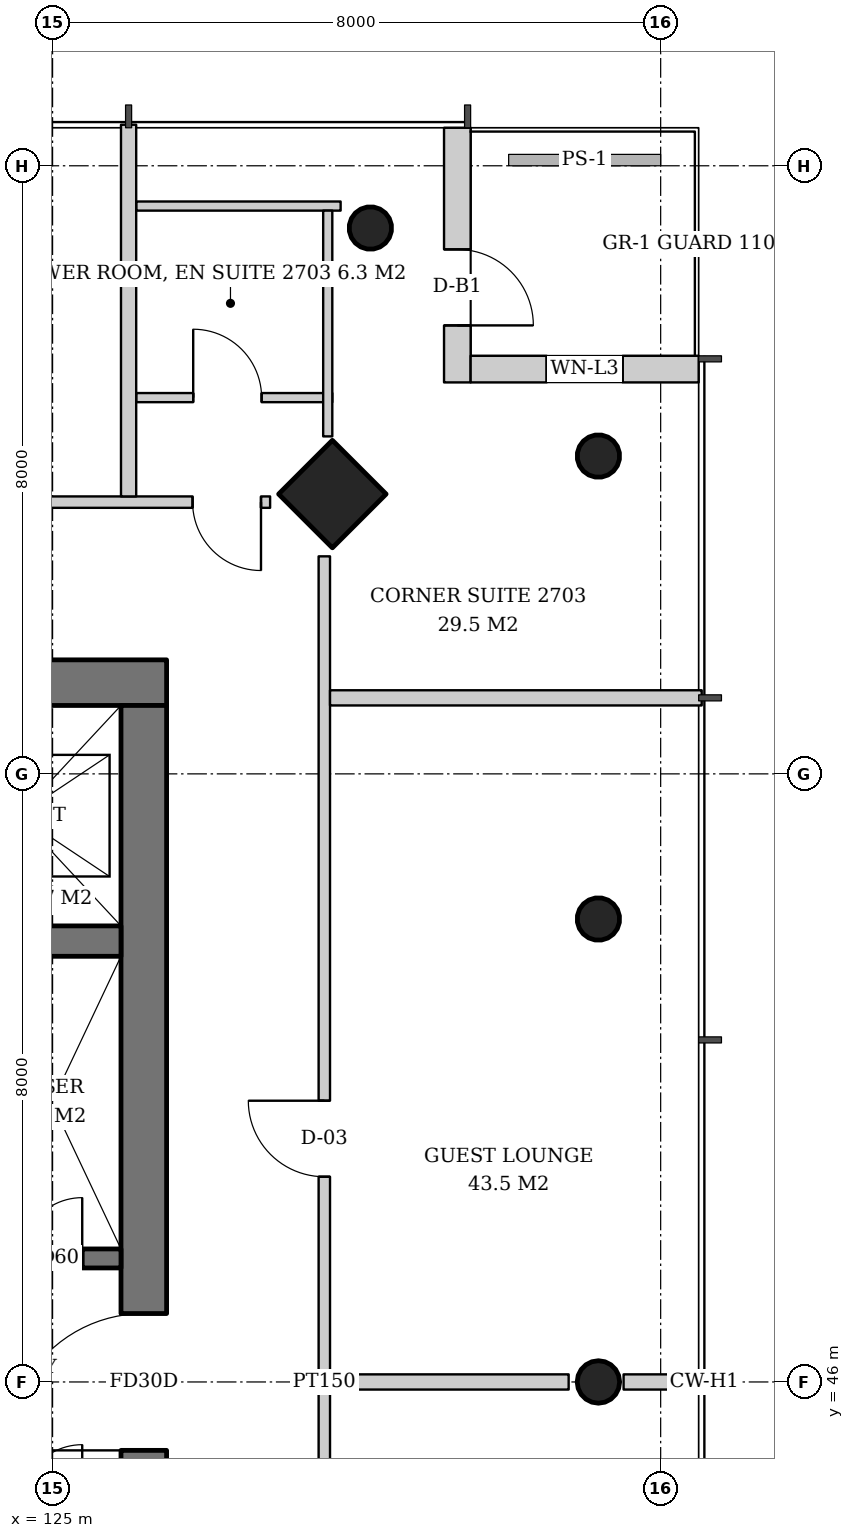
"""IFC4 building model, lengths in metres.
Left out: names, types, materials, properties, quantities, classifications, styles, units other than length and angle.
Written with IfcOpenShell. Run it as: python <this file> out.ifc"""

import sys

from ifc_helpers import new_model, si_unit, direction, frame, frame_2d, origin, origin_2d, place, context, subcontext, project, spatial, rectangle, hollow_circle, extrude, element, fill, save


model = new_model("IFC4")
c1 = context("Model", 3, precision=1e-05, world=origin(), true_north=direction((0.0, 1.0)))
c2 = subcontext(c1, "Body", "Model", "MODEL_VIEW")
j1 = project(units=[si_unit("LENGTHUNIT", "METRE"), si_unit("PLANEANGLEUNIT", "RADIAN")], contexts=[c1])
p1 = place(None, origin())
s1 = spatial("IfcSite", under=j1, at=p1, CompositionType="ELEMENT")
p2 = place(p1, origin())
s2 = spatial("IfcBuilding", under=s1, at=p2, CompositionType="ELEMENT")
p3 = place(p2, frame((0.0, 0.0, 108.4)))
s3 = spatial("IfcBuildingStorey", under=s2, at=p3, CompositionType="ELEMENT", Elevation=108.4)
p4 = place(p3, frame((128.733, 57.733, 0.0), z_axis=(-0.043029647111, -0.043029647111, 0.998146732169), x_axis=(0.707106781187, -0.707106781187, 0.0)))
e1 = element("IfcColumn", 1, at=p4, inside=s3, PredefinedType="COLUMN", context=c2, shape_type="SweptSolid", body=[
    extrude(rectangle(XDim=1.0, YDim=1.0, at=origin_2d()), origin(), (0.0, 0.0, 1.0), 3.807),
])
p5 = place(p3, frame((132.233, 58.233, 0.0), z_axis=(-0.043029647111, -0.043029647111, 0.998146732169), x_axis=(0.707106781187, -0.707106781187, 0.0)))
e2 = element("IfcColumn", 2, at=p5, inside=s3, PredefinedType="COLUMN", context=c2, shape_type="SweptSolid", body=[
    extrude(hollow_circle(Radius=0.28, WallThickness=0.02, at=origin_2d()), origin(), (0.0, 0.0, 1.0), 3.807),
])
p6 = place(p3, frame((132.233, 46.0, 0.0), z_axis=(-0.043069538298, 0.0, 0.999072076915), x_axis=(0.0, -1.0, 0.0)))
e3 = element("IfcColumn", 3, at=p6, inside=s3, PredefinedType="COLUMN", context=c2, shape_type="SweptSolid", body=[
    extrude(hollow_circle(Radius=0.28, WallThickness=0.02, at=origin_2d()), origin(), (0.0, 0.0, 1.0), 3.803),
])
p7 = place(p3, frame((132.233, 52.116, 0.0), z_axis=(-0.043059525333, -0.021561848751, 0.998839808957), x_axis=(0.44774654769, -0.894160516368, 0.0)))
e4 = element("IfcColumn", 4, at=p7, inside=s3, PredefinedType="COLUMN", context=c2, shape_type="SweptSolid", body=[
    extrude(hollow_circle(Radius=0.28, WallThickness=0.02, at=origin_2d()), origin(), (0.0, 0.0, 1.0), 3.804),
])
p8 = place(p3, frame((129.233, 61.233, 0.0), z_axis=(-0.043029647111, -0.043029647111, 0.998146732169), x_axis=(0.707106781187, -0.707106781187, 0.0)))
e5 = element("IfcColumn", 5, at=p8, inside=s3, PredefinedType="COLUMN", context=c2, shape_type="SweptSolid", body=[
    extrude(hollow_circle(Radius=0.28, WallThickness=0.02, at=origin_2d()), origin(), (0.0, 0.0, 1.0), 3.807),
])
p9 = place(p3, frame((107.5, 55.2, 0.0), z_axis=(0.0, 0.0, 1.0), x_axis=(1.0, 0.0, 0.0)))
e6 = element("IfcWall", 6, at=p9, inside=s3, PredefinedType="SHEAR", context=c2, shape_type="SweptSolid", body=[
    extrude(rectangle(XDim=19.0, YDim=0.6, at=frame_2d((9.5, 0.0))), origin(), (0.0, 0.0, 1.0), 3.8),
])
p10 = place(p9, frame((14.14, 0.0, 0.0)))
e7 = element("IfcOpeningElement", 7, at=p10, cuts=e6, PredefinedType="OPENING", context=c2, shape_type="SweptSolid", body=[
    extrude(rectangle(XDim=1.0, YDim=2.1, at=frame_2d((0.5, 1.05))), frame((0.0, 0.31, 0.0), z_axis=(0.0, -1.0, 0.0), x_axis=(1.0, 0.0, 0.0)), (0.0, 0.0, 1.0), 0.62),
])
p11 = place(p9, frame((1.675, 0.0, 0.0)))
e8 = element("IfcOpeningElement", 8, at=p11, cuts=e6, PredefinedType="OPENING", context=c2, shape_type="SweptSolid", body=[
    extrude(rectangle(XDim=1.0, YDim=2.1, at=frame_2d((0.5, 1.05))), frame((0.0, 0.31, 0.0), z_axis=(0.0, -1.0, 0.0), x_axis=(1.0, 0.0, 0.0)), (0.0, 0.0, 1.0), 0.62),
])
p12 = place(p9, frame((3.587, 0.0, 0.0)))
e9 = element("IfcOpeningElement", 9, at=p12, cuts=e6, PredefinedType="OPENING", context=c2, shape_type="SweptSolid", body=[
    extrude(rectangle(XDim=1.0, YDim=2.1, at=frame_2d((0.5, 1.05))), frame((0.0, 0.31, 0.0), z_axis=(0.0, -1.0, 0.0), x_axis=(1.0, 0.0, 0.0)), (0.0, 0.0, 1.0), 0.62),
])
p13 = place(p3, frame((126.2, 37.1, 0.0), z_axis=(0.0, 0.0, 1.0), x_axis=(0.0, 1.0, 0.0)))
e10 = element("IfcWall", 10, at=p13, inside=s3, PredefinedType="SHEAR", context=c2, shape_type="SweptSolid", body=[
    extrude(rectangle(XDim=17.8, YDim=0.6, at=frame_2d((8.9, 0.0))), origin(), (0.0, 0.0, 1.0), 3.8),
])
p14 = place(p13, frame((8.0, 0.0, 0.0)))
e11 = element("IfcOpeningElement", 11, at=p14, cuts=e10, PredefinedType="OPENING", context=c2, shape_type="SweptSolid", body=[
    extrude(rectangle(XDim=1.8, YDim=2.4, at=frame_2d((0.9, 1.2))), frame((0.0, 0.31, 0.0), z_axis=(0.0, -1.0, 0.0), x_axis=(1.0, 0.0, 0.0)), (0.0, 0.0, 1.0), 0.62),
])
p15 = place(p3, frame((108.1, 51.8, 0.0), z_axis=(0.0, 0.0, 1.0), x_axis=(1.0, 0.0, 0.0)))
e12 = element("IfcWall", 12, at=p15, inside=s3, PredefinedType="SHEAR", context=c2, shape_type="SweptSolid", body=[
    extrude(rectangle(XDim=17.8, YDim=0.4, at=frame_2d((8.9, 0.0))), origin(), (0.0, 0.0, 1.0), 3.8),
])
p16 = place(p3, frame((130.325, 62.5, 0.0), z_axis=(0.0, 0.0, 1.0), x_axis=(0.0, -1.0, 0.0)))
e13 = element("IfcWall", 13, at=p16, inside=s3, PredefinedType="SOLIDWALL", context=c2, shape_type="SweptSolid", body=[
    extrude(rectangle(XDim=3.35, YDim=0.35, at=frame_2d((1.675, 0.0))), origin(), (0.0, 0.0, 1.0), 3.6),
])
p17 = place(p16, frame((1.6, 0.0, 0.0)))
e14 = element("IfcOpeningElement", 14, at=p17, cuts=e13, PredefinedType="OPENING", context=c2, shape_type="SweptSolid", body=[
    extrude(rectangle(XDim=1.0, YDim=2.4, at=frame_2d((0.5, 1.2))), frame((0.0, 0.185, 0.0), z_axis=(0.0, -1.0, 0.0), x_axis=(1.0, 0.0, 0.0)), (0.0, 0.0, 1.0), 0.37),
])
p18 = place(p3, frame((130.5, 59.325, 0.0), z_axis=(0.0, 0.0, 1.0), x_axis=(1.0, 0.0, 0.0)))
e15 = element("IfcWall", 15, at=p18, inside=s3, PredefinedType="SOLIDWALL", context=c2, shape_type="SweptSolid", body=[
    extrude(rectangle(XDim=3.0, YDim=0.35, at=frame_2d((1.5, 0.0))), origin(), (0.0, 0.0, 1.0), 3.6),
])
p19 = place(p18, frame((1.0, 0.0, 0.9)))
e16 = element("IfcOpeningElement", 16, at=p19, cuts=e15, PredefinedType="OPENING", context=c2, shape_type="SweptSolid", body=[
    extrude(rectangle(XDim=1.0, YDim=2.4, at=frame_2d((0.5, 1.2))), frame((0.0, 0.185, 0.0), z_axis=(0.0, -1.0, 0.0), x_axis=(1.0, 0.0, 0.0)), (0.0, 0.0, 1.0), 0.37),
])
p20 = place(p3, frame((121.33, 47.625, 0.0), z_axis=(0.0, 0.0, 1.0), x_axis=(1.0, 0.0, 0.0)))
e17 = element("IfcWall", 17, at=p20, inside=s3, PredefinedType="SHEAR", context=c2, shape_type="SweptSolid", body=[
    extrude(rectangle(XDim=4.57, YDim=0.25, at=frame_2d((2.285, 0.0))), origin(), (0.0, 0.0, 1.0), 3.8),
])
p21 = place(p20, frame((0.55, 0.0, 0.0)))
e18 = element("IfcOpeningElement", 18, at=p21, cuts=e17, PredefinedType="OPENING", context=c2, shape_type="SweptSolid", body=[
    extrude(rectangle(XDim=1.4, YDim=2.4, at=frame_2d((0.7, 1.2))), frame((0.0, 0.135, 0.0), z_axis=(0.0, -1.0, 0.0), x_axis=(1.0, 0.0, 0.0)), (0.0, 0.0, 1.0), 0.27),
])
p22 = place(p20, frame((3.26, 0.0, 0.0)))
e19 = element("IfcOpeningElement", 19, at=p22, cuts=e17, PredefinedType="OPENING", context=c2, shape_type="SweptSolid", body=[
    extrude(rectangle(XDim=0.8, YDim=2.0, at=frame_2d((0.4, 1.0))), frame((0.0, 0.135, 0.0), z_axis=(0.0, -1.0, 0.0), x_axis=(1.0, 0.0, 0.0)), (0.0, 0.0, 1.0), 0.27),
])
p23 = place(p3, frame((128.575, 35.138, 0.0), z_axis=(0.0, 0.0, 1.0), x_axis=(0.0, 1.0, 0.0)))
e20 = element("IfcWall", 20, at=p23, inside=s3, PredefinedType="PARTITIONING", context=c2, shape_type="SweptSolid", body=[
    extrude(rectangle(XDim=21.724, YDim=0.15, at=frame_2d((10.862, 0.0))), origin(), (0.0, 0.0, 1.0), 2.9),
])
p24 = place(p23, frame((0.12, 0.0, 0.0)))
e21 = element("IfcOpeningElement", 21, at=p24, cuts=e20, PredefinedType="OPENING", context=c2, shape_type="SweptSolid", body=[
    extrude(rectangle(XDim=0.9, YDim=2.1, at=frame_2d((0.45, 1.05))), frame((0.0, 0.085, 0.0), z_axis=(0.0, -1.0, 0.0), x_axis=(1.0, 0.0, 0.0)), (0.0, 0.0, 1.0), 0.17),
])
p25 = place(p23, frame((4.612, 0.0, 0.0)))
e22 = element("IfcOpeningElement", 22, at=p25, cuts=e20, PredefinedType="OPENING", context=c2, shape_type="SweptSolid", body=[
    extrude(rectangle(XDim=0.9, YDim=2.1, at=frame_2d((0.45, 1.05))), frame((0.0, 0.085, 0.0), z_axis=(0.0, -1.0, 0.0), x_axis=(1.0, 0.0, 0.0)), (0.0, 0.0, 1.0), 0.17),
])
p26 = place(p23, frame((13.562, 0.0, 0.0)))
e23 = element("IfcOpeningElement", 23, at=p26, cuts=e20, PredefinedType="OPENING", context=c2, shape_type="SweptSolid", body=[
    extrude(rectangle(XDim=1.0, YDim=2.1, at=frame_2d((0.5, 1.05))), frame((0.0, 0.085, 0.0), z_axis=(0.0, -1.0, 0.0), x_axis=(1.0, 0.0, 0.0)), (0.0, 0.0, 1.0), 0.17),
])
p27 = place(p3, frame((128.65, 46.0, 0.0), z_axis=(0.0, 0.0, 1.0), x_axis=(1.0, 0.0, 0.0)))
e24 = element("IfcWall", 24, at=p27, inside=s3, PredefinedType="PARTITIONING", context=c2, shape_type="SweptSolid", body=[
    extrude(rectangle(XDim=3.14, YDim=0.2, at=frame_2d((1.57, 0.0))), origin(), (0.0, 0.0, 1.0), 3.6),
])
p28 = place(p3, frame((132.512, 46.0, 0.0), z_axis=(0.0, 0.0, 1.0), x_axis=(1.0, 0.0, 0.0)))
e25 = element("IfcWall", 25, at=p28, inside=s3, PredefinedType="PARTITIONING", context=c2, shape_type="SweptSolid", body=[
    extrude(rectangle(XDim=1.028, YDim=0.2, at=frame_2d((0.514, 0.0))), origin(), (0.0, 0.0, 1.0), 3.6),
])
p29 = place(p3, frame((128.65, 55.0, 0.0), z_axis=(0.0, 0.0, 1.0), x_axis=(1.0, 0.0, 0.0)))
e26 = element("IfcWall", 26, at=p29, inside=s3, PredefinedType="PARTITIONING", context=c2, shape_type="SweptSolid", body=[
    extrude(rectangle(XDim=4.89, YDim=0.2, at=frame_2d((2.445, 0.0))), origin(), (0.0, 0.0, 1.0), 3.2),
])
p30 = place(p3, frame((126.1, 58.95, 0.0), z_axis=(0.0, 0.0, 1.0), x_axis=(1.0, 0.0, 0.0)))
e27 = element("IfcWall", 27, at=p30, inside=s3, PredefinedType="PARTITIONING", context=c2, shape_type="SweptSolid", body=[
    extrude(rectangle(XDim=2.58, YDim=0.12, at=frame_2d((1.29, 0.0))), origin(), (0.0, 0.0, 1.0), 2.9),
])
p31 = place(p30, frame((0.75, 0.0, 0.0)))
e28 = element("IfcOpeningElement", 28, at=p31, cuts=e27, PredefinedType="OPENING", context=c2, shape_type="SweptSolid", body=[
    extrude(rectangle(XDim=0.9, YDim=2.1, at=frame_2d((0.45, 1.05))), frame((0.0, 0.07, 0.0), z_axis=(0.0, -1.0, 0.0), x_axis=(1.0, 0.0, 0.0)), (0.0, 0.0, 1.0), 0.14),
])
p32 = place(p3, frame((126.1, 61.47, 0.0), z_axis=(0.0, 0.0, 1.0), x_axis=(1.0, 0.0, 0.0)))
e29 = element("IfcWall", 29, at=p32, inside=s3, PredefinedType="PARTITIONING", context=c2, shape_type="SweptSolid", body=[
    extrude(rectangle(XDim=2.689, YDim=0.12, at=frame_2d((1.345, 0.0))), origin(), (0.0, 0.0, 1.0), 3.6),
])
p33 = place(p3, frame((128.62, 58.44, 0.0), z_axis=(0.0, 0.0, 1.0), x_axis=(0.0, 1.0, 0.0)))
e30 = element("IfcWall", 30, at=p33, inside=s3, PredefinedType="PARTITIONING", context=c2, shape_type="SweptSolid", body=[
    extrude(rectangle(XDim=2.97, YDim=0.12, at=frame_2d((1.485, 0.0))), origin(), (0.0, 0.0, 1.0), 3.2),
])
p34 = place(p3, frame((127.862, 57.575, 0.0), z_axis=(0.0, 0.0, 1.0), x_axis=(-1.0, 0.0, 0.0)))
e31 = element("IfcWall", 31, at=p34, inside=s3, PredefinedType="PARTITIONING", context=c2, shape_type="SweptSolid", body=[
    extrude(rectangle(XDim=21.724, YDim=0.15, at=frame_2d((10.862, 0.0))), origin(), (0.0, 0.0, 1.0), 2.9),
])
p35 = place(p34, frame((0.12, 0.0, 0.0)))
e32 = element("IfcOpeningElement", 32, at=p35, cuts=e31, PredefinedType="OPENING", context=c2, shape_type="SweptSolid", body=[
    extrude(rectangle(XDim=0.9, YDim=2.1, at=frame_2d((0.45, 1.05))), frame((0.0, 0.085, 0.0), z_axis=(0.0, -1.0, 0.0), x_axis=(1.0, 0.0, 0.0)), (0.0, 0.0, 1.0), 0.17),
])
p36 = place(p34, frame((4.562, 0.0, 0.0)))
e33 = element("IfcOpeningElement", 33, at=p36, cuts=e31, PredefinedType="OPENING", context=c2, shape_type="SweptSolid", body=[
    extrude(rectangle(XDim=1.0, YDim=2.1, at=frame_2d((0.5, 1.05))), frame((0.0, 0.085, 0.0), z_axis=(0.0, -1.0, 0.0), x_axis=(1.0, 0.0, 0.0)), (0.0, 0.0, 1.0), 0.17),
])
p37 = place(p34, frame((13.612, 0.0, 0.0)))
e34 = element("IfcOpeningElement", 34, at=p37, cuts=e31, PredefinedType="OPENING", context=c2, shape_type="SweptSolid", body=[
    extrude(rectangle(XDim=0.9, YDim=2.1, at=frame_2d((0.45, 1.05))), frame((0.0, 0.085, 0.0), z_axis=(0.0, -1.0, 0.0), x_axis=(1.0, 0.0, 0.0)), (0.0, 0.0, 1.0), 0.17),
])
p38 = place(p3, frame((126.0, 57.65, 0.0), z_axis=(0.0, 0.0, 1.0), x_axis=(0.0, 1.0, 0.0)))
e35 = element("IfcWall", 35, at=p38, inside=s3, PredefinedType="PARTITIONING", context=c2, shape_type="SweptSolid", body=[
    extrude(rectangle(XDim=4.89, YDim=0.2, at=frame_2d((2.445, 0.0))), origin(), (0.0, 0.0, 1.0), 2.9),
])
p39 = place(p17, origin())
e36 = element("IfcDoor", 36, at=p39, inside=s3, OperationType="SINGLE_SWING_RIGHT", PredefinedType="DOOR", context=c2, shape_type="SweptSolid", body=[
    extrude(rectangle(XDim=1.0, YDim=2.4, at=frame_2d((0.5, 1.2))), frame((0.0, 0.025, 0.0), z_axis=(0.0, -1.0, 0.0), x_axis=(1.0, 0.0, 0.0)), (0.0, 0.0, 1.0), 0.05),
])
fill(e14, e36)
p40 = place(p19, origin())
e37 = element("IfcWindow", 37, at=p40, inside=s3, PartitioningType="SINGLE_PANEL", PredefinedType="WINDOW", context=c2, shape_type="SweptSolid", body=[
    extrude(rectangle(XDim=1.0, YDim=2.4, at=frame_2d((0.5, 1.2))), frame((0.0, 0.03, 0.0), z_axis=(0.0, -1.0, 0.0), x_axis=(1.0, 0.0, 0.0)), (0.0, 0.0, 1.0), 0.06),
])
fill(e16, e37)
p41 = place(p22, origin())
e38 = element("IfcDoor", 38, at=p41, inside=s3, OperationType="SINGLE_SWING_RIGHT", PredefinedType="DOOR", context=c2, shape_type="SweptSolid", body=[
    extrude(rectangle(XDim=0.8, YDim=2.0, at=frame_2d((0.4, 1.0))), frame((0.0, 0.025, 0.0), z_axis=(0.0, -1.0, 0.0), x_axis=(1.0, 0.0, 0.0)), (0.0, 0.0, 1.0), 0.05),
])
fill(e19, e38)
p42 = place(p14, origin())
e39 = element("IfcDoor", 39, at=p42, inside=s3, OperationType="DOUBLE_DOOR_SINGLE_SWING", PredefinedType="DOOR", context=c2, shape_type="SweptSolid", body=[
    extrude(rectangle(XDim=1.8, YDim=2.4, at=frame_2d((0.9, 1.2))), frame((0.0, 0.025, 0.0), z_axis=(0.0, -1.0, 0.0), x_axis=(1.0, 0.0, 0.0)), (0.0, 0.0, 1.0), 0.05),
])
fill(e11, e39)
p43 = place(p26, origin())
e40 = element("IfcDoor", 40, at=p43, inside=s3, OperationType="SINGLE_SWING_RIGHT", PredefinedType="DOOR", context=c2, shape_type="SweptSolid", body=[
    extrude(rectangle(XDim=1.0, YDim=2.1, at=frame_2d((0.5, 1.05))), frame((0.0, 0.025, 0.0), z_axis=(0.0, -1.0, 0.0), x_axis=(1.0, 0.0, 0.0)), (0.0, 0.0, 1.0), 0.05),
])
fill(e23, e40)
p44 = place(p31, origin())
e41 = element("IfcDoor", 41, at=p44, inside=s3, OperationType="SINGLE_SWING_LEFT", PredefinedType="DOOR", context=c2, shape_type="SweptSolid", body=[
    extrude(rectangle(XDim=0.9, YDim=2.1, at=frame_2d((0.45, 1.05))), frame((0.0, 0.025, 0.0), z_axis=(0.0, -1.0, 0.0), x_axis=(1.0, 0.0, 0.0)), (0.0, 0.0, 1.0), 0.05),
])
fill(e28, e41)
p45 = place(p35, origin())
e42 = element("IfcDoor", 42, at=p45, inside=s3, OperationType="SINGLE_SWING_LEFT", PredefinedType="DOOR", context=c2, shape_type="SweptSolid", body=[
    extrude(rectangle(XDim=0.9, YDim=2.1, at=frame_2d((0.45, 1.05))), frame((0.0, 0.025, 0.0), z_axis=(0.0, -1.0, 0.0), x_axis=(1.0, 0.0, 0.0)), (0.0, 0.0, 1.0), 0.05),
])
fill(e32, e42)
save(model, sys.argv[1])
